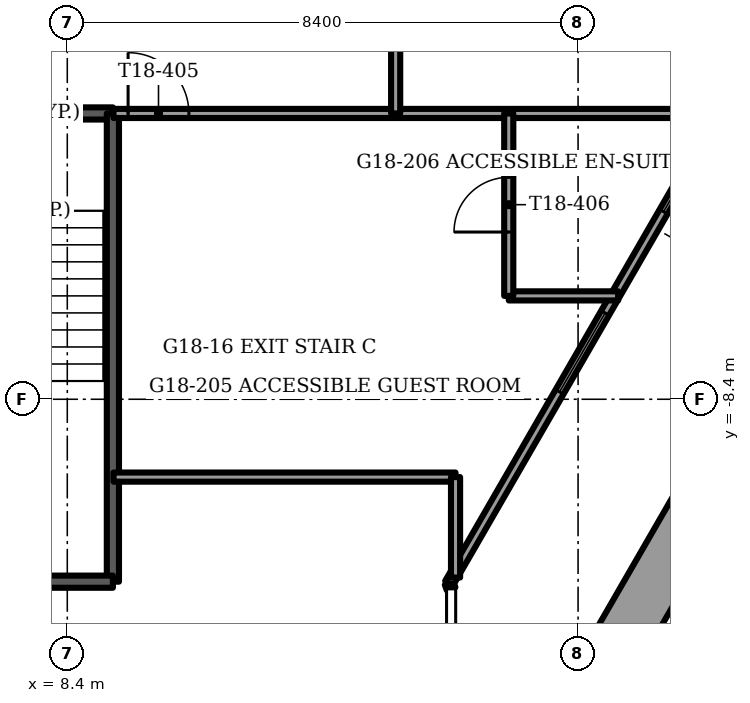
"""IFC4 building model, lengths in metres.
Left out: names, types, materials, properties, quantities, classifications, styles, units other than length and angle.
Written with IfcOpenShell. Run it as: python <this file> out.ifc"""

import sys

from ifc_helpers import new_model, si_unit, direction, frame, frame_2d, origin, place, context, subcontext, project, spatial, rectangle, extrude, element, fill, save


model = new_model("IFC4")
c1 = context("Model", 3, precision=1e-05, world=origin(), true_north=direction((0.0, 1.0)))
c2 = subcontext(c1, "Body", "Model", "MODEL_VIEW")
j1 = project(units=[si_unit("LENGTHUNIT", "METRE"), si_unit("PLANEANGLEUNIT", "RADIAN")], contexts=[c1])
p1 = place(None, origin())
s1 = spatial("IfcSite", under=j1, at=p1, CompositionType="ELEMENT")
p2 = place(p1, origin())
s2 = spatial("IfcBuilding", under=s1, at=p2, CompositionType="ELEMENT")
p3 = place(p2, frame((0.0, 0.0, 73.0)))
s3 = spatial("IfcBuildingStorey", under=s2, at=p3, CompositionType="ELEMENT", Elevation=73.0)
p4 = place(p3, frame((16.727, -13.728, 0.0), z_axis=(0.0, 0.0, 1.0), x_axis=(0.499997206141, 0.866027016814, 0.0)))
e1 = element("IfcWall", 1, at=p4, inside=s3, PredefinedType="PARAPET", context=c2, shape_type="SweptSolid", body=[
    extrude(rectangle(XDim=7.051, YDim=0.9, at=frame_2d((3.525, 0.0))), origin(), (0.0, 0.0, 1.0), 1.1),
])
p5 = place(p3, frame((14.679, -11.425, 0.0), z_axis=(0.0, 0.0, 1.0), x_axis=(0.499991453095, 0.866030338286, 0.0)))
e2 = element("IfcWall", 2, at=p5, inside=s3, PredefinedType="SOLIDWALL", context=c2, shape_type="SweptSolid", body=[
    extrude(rectangle(XDim=11.444, YDim=0.15, at=frame_2d((5.722, 0.0))), origin(), (0.0, 0.0, 1.0), 3.45),
])
p6 = place(p5, frame((3.632, 0.0, 0.15)))
e3 = element("IfcOpeningElement", 3, at=p6, cuts=e2, PredefinedType="OPENING", context=c2, shape_type="SweptSolid", body=[
    extrude(rectangle(XDim=1.5, YDim=2.2, at=frame_2d((0.75, 1.1))), frame((0.0, 0.075, 0.0), z_axis=(0.0, -1.0, 0.0), x_axis=(1.0, 0.0, 0.0)), (0.0, 0.0, 1.0), 0.15),
])
p7 = place(p5, frame((7.055, 0.0, 0.15)))
e4 = element("IfcOpeningElement", 4, at=p7, cuts=e2, PredefinedType="OPENING", context=c2, shape_type="SweptSolid", body=[
    extrude(rectangle(XDim=0.9, YDim=2.2, at=frame_2d((0.45, 1.1))), frame((0.0, 0.075, 0.0), z_axis=(0.0, -1.0, 0.0), x_axis=(1.0, 0.0, 0.0)), (0.0, 0.0, 1.0), 0.15),
])
p8 = place(p3, frame((14.679, -11.425, 0.0), z_axis=(0.0, 0.0, 1.0), x_axis=(0.338543167143, -0.940950861619, 0.0)))
e5 = element("IfcWall", 5, at=p8, inside=s3, PredefinedType="SOLIDWALL", context=c2, shape_type="SweptSolid", body=[
    extrude(rectangle(XDim=0.098, YDim=0.15, at=frame_2d((0.049, 0.0))), origin(), (0.0, 0.0, 1.0), 3.45),
])
p9 = place(p3, frame((5.8, -3.7, -0.3), z_axis=(0.0, 0.0, 1.0), x_axis=(1.0, 0.0, 0.0)))
e6 = element("IfcWall", 6, at=p9, inside=s3, PredefinedType="SOLIDWALL", context=c2, shape_type="SweptSolid", body=[
    extrude(rectangle(XDim=3.35, YDim=0.2, at=frame_2d((1.675, 0.0))), origin(), (0.0, 0.0, 1.0), 3.75),
])
p10 = place(p9, frame((1.125, 0.0, 0.0)))
e7 = element("IfcOpeningElement", 7, at=p10, cuts=e6, PredefinedType="OPENING", context=c2, shape_type="SweptSolid", body=[
    extrude(rectangle(XDim=1.1, YDim=2.1, at=frame_2d((0.55, 1.05))), frame((0.0, 0.1, 0.0), z_axis=(0.0, -1.0, 0.0), x_axis=(1.0, 0.0, 0.0)), (0.0, 0.0, 1.0), 0.2),
])
p11 = place(p3, frame((9.15, -3.7, -0.3), z_axis=(0.0, 0.0, 1.0), x_axis=(0.0, -1.0, 0.0)))
e8 = element("IfcWall", 8, at=p11, inside=s3, PredefinedType="SOLIDWALL", context=c2, shape_type="SweptSolid", body=[
    extrude(rectangle(XDim=7.7, YDim=0.2, at=frame_2d((3.85, 0.0))), origin(), (0.0, 0.0, 1.0), 3.75),
])
p12 = place(p3, frame((5.8, -11.4, -0.3), z_axis=(0.0, 0.0, 1.0), x_axis=(1.0, 0.0, 0.0)))
e9 = element("IfcWall", 9, at=p12, inside=s3, PredefinedType="SOLIDWALL", context=c2, shape_type="SweptSolid", body=[
    extrude(rectangle(XDim=3.35, YDim=0.2, at=frame_2d((1.675, 0.0))), origin(), (0.0, 0.0, 1.0), 3.75),
])
p13 = place(p3, frame((9.16, -9.68, 0.0), z_axis=(0.0, 0.0, 1.0), x_axis=(1.0, 0.0, 0.0)))
e10 = element("IfcWall", 10, at=p13, inside=s3, PredefinedType="PARTITIONING", context=c2, shape_type="SweptSolid", body=[
    extrude(rectangle(XDim=5.625, YDim=0.15, at=frame_2d((2.812, 0.0))), origin(), (0.0, 0.0, 1.0), 3.45),
])
p14 = place(p3, frame((15.66, -6.7, 0.0), z_axis=(0.0, 0.0, 1.0), x_axis=(1.0, 0.0, 0.0)))
e11 = element("IfcWall", 11, at=p14, inside=s3, PredefinedType="PARTITIONING", context=c2, shape_type="SweptSolid", body=[
    extrude(rectangle(XDim=1.799, YDim=0.15, at=frame_2d((0.899, 0.0))), origin(), (0.0, 0.0, 1.0), 3.45),
])
p15 = place(p3, frame((9.16, -3.7, 0.0), z_axis=(0.0, 0.0, 1.0), x_axis=(1.0, 0.0, 0.0)))
e12 = element("IfcWall", 12, at=p15, inside=s3, PredefinedType="PARTITIONING", context=c2, shape_type="SweptSolid", body=[
    extrude(rectangle(XDim=10.031, YDim=0.15, at=frame_2d((5.016, 0.0))), origin(), (0.0, 0.0, 1.0), 3.45),
])
p16 = place(p15, frame((0.24, 0.0, 0.0)))
e13 = element("IfcOpeningElement", 13, at=p16, cuts=e12, PredefinedType="OPENING", context=c2, shape_type="SweptSolid", body=[
    extrude(rectangle(XDim=1.0, YDim=2.1, at=frame_2d((0.5, 1.05))), frame((0.0, 0.075, 0.0), z_axis=(0.0, -1.0, 0.0), x_axis=(1.0, 0.0, 0.0)), (0.0, 0.0, 1.0), 0.15),
])
p17 = place(p3, frame((15.66, -6.7, 0.0), z_axis=(0.0, 0.0, 1.0), x_axis=(0.0, 1.0, 0.0)))
e14 = element("IfcWall", 14, at=p17, inside=s3, PredefinedType="PARTITIONING", context=c2, shape_type="SweptSolid", body=[
    extrude(rectangle(XDim=3.0, YDim=0.15, at=frame_2d((1.5, 0.0))), origin(), (0.0, 0.0, 1.0), 3.45),
])
p18 = place(p17, frame((1.05, 0.0, 0.0)))
e15 = element("IfcOpeningElement", 15, at=p18, cuts=e14, PredefinedType="OPENING", context=c2, shape_type="SweptSolid", body=[
    extrude(rectangle(XDim=0.9, YDim=2.1, at=frame_2d((0.45, 1.05))), frame((0.0, 0.075, 0.0), z_axis=(0.0, -1.0, 0.0), x_axis=(1.0, 0.0, 0.0)), (0.0, 0.0, 1.0), 0.15),
])
p19 = place(p3, frame((14.785, -11.332, 0.0), z_axis=(0.0, 0.0, 1.0), x_axis=(0.0, 1.0, 0.0)))
e16 = element("IfcWall", 16, at=p19, inside=s3, PredefinedType="PARTITIONING", context=c2, shape_type="SweptSolid", body=[
    extrude(rectangle(XDim=1.652, YDim=0.15, at=frame_2d((0.826, 0.0))), origin(), (0.0, 0.0, 1.0), 3.45),
])
p20 = place(p3, frame((13.8, -3.7, 0.0), z_axis=(0.0, 0.0, 1.0), x_axis=(0.0, 1.0, 0.0)))
e17 = element("IfcWall", 17, at=p20, inside=s3, PredefinedType="PARTITIONING", context=c2, shape_type="SweptSolid", body=[
    extrude(rectangle(XDim=11.415, YDim=0.15, at=frame_2d((5.708, 0.0))), origin(), (0.0, 0.0, 1.0), 3.45),
])
p21 = place(p20, frame((4.469, 0.0, 0.0)))
e18 = element("IfcOpeningElement", 18, at=p21, cuts=e17, PredefinedType="OPENING", context=c2, shape_type="SweptSolid", body=[
    extrude(rectangle(XDim=1.0, YDim=2.1, at=frame_2d((0.5, 1.05))), frame((0.0, 0.075, 0.0), z_axis=(0.0, -1.0, 0.0), x_axis=(1.0, 0.0, 0.0)), (0.0, 0.0, 1.0), 0.15),
])
p22 = place(p20, frame((9.407, 0.0, 0.0)))
e19 = element("IfcOpeningElement", 19, at=p22, cuts=e17, PredefinedType="OPENING", context=c2, shape_type="SweptSolid", body=[
    extrude(rectangle(XDim=1.0, YDim=2.1, at=frame_2d((0.5, 1.05))), frame((0.0, 0.075, 0.0), z_axis=(0.0, -1.0, 0.0), x_axis=(1.0, 0.0, 0.0)), (0.0, 0.0, 1.0), 0.15),
])
p23 = place(p6, origin())
e20 = element("IfcWindow", 20, at=p23, inside=s3, PartitioningType="SINGLE_PANEL", PredefinedType="WINDOW", context=c2, shape_type="SweptSolid", body=[
    extrude(rectangle(XDim=1.5, YDim=2.2, at=frame_2d((0.75, 1.1))), frame((0.0, 0.03, 0.0), z_axis=(0.0, -1.0, 0.0), x_axis=(1.0, 0.0, 0.0)), (0.0, 0.0, 1.0), 0.06),
])
fill(e3, e20)
p24 = place(p7, origin())
e21 = element("IfcWindow", 21, at=p24, inside=s3, PartitioningType="SINGLE_PANEL", PredefinedType="WINDOW", context=c2, shape_type="SweptSolid", body=[
    extrude(rectangle(XDim=0.9, YDim=2.2, at=frame_2d((0.45, 1.1))), frame((0.0, 0.03, 0.0), z_axis=(0.0, -1.0, 0.0), x_axis=(1.0, 0.0, 0.0)), (0.0, 0.0, 1.0), 0.06),
])
fill(e4, e21)
p25 = place(p16, origin())
e22 = element("IfcDoor", 22, at=p25, inside=s3, OperationType="SINGLE_SWING_LEFT", PredefinedType="DOOR", context=c2, shape_type="SweptSolid", body=[
    extrude(rectangle(XDim=1.0, YDim=2.1, at=frame_2d((0.5, 1.05))), frame((0.0, 0.025, 0.0), z_axis=(0.0, -1.0, 0.0), x_axis=(1.0, 0.0, 0.0)), (0.0, 0.0, 1.0), 0.05),
])
fill(e13, e22)
p26 = place(p18, origin())
e23 = element("IfcDoor", 23, at=p26, inside=s3, OperationType="SINGLE_SWING_RIGHT", PredefinedType="DOOR", context=c2, shape_type="SweptSolid", body=[
    extrude(rectangle(XDim=0.9, YDim=2.1, at=frame_2d((0.45, 1.05))), frame((0.0, 0.025, 0.0), z_axis=(0.0, -1.0, 0.0), x_axis=(1.0, 0.0, 0.0)), (0.0, 0.0, 1.0), 0.05),
])
fill(e15, e23)
save(model, sys.argv[1])
